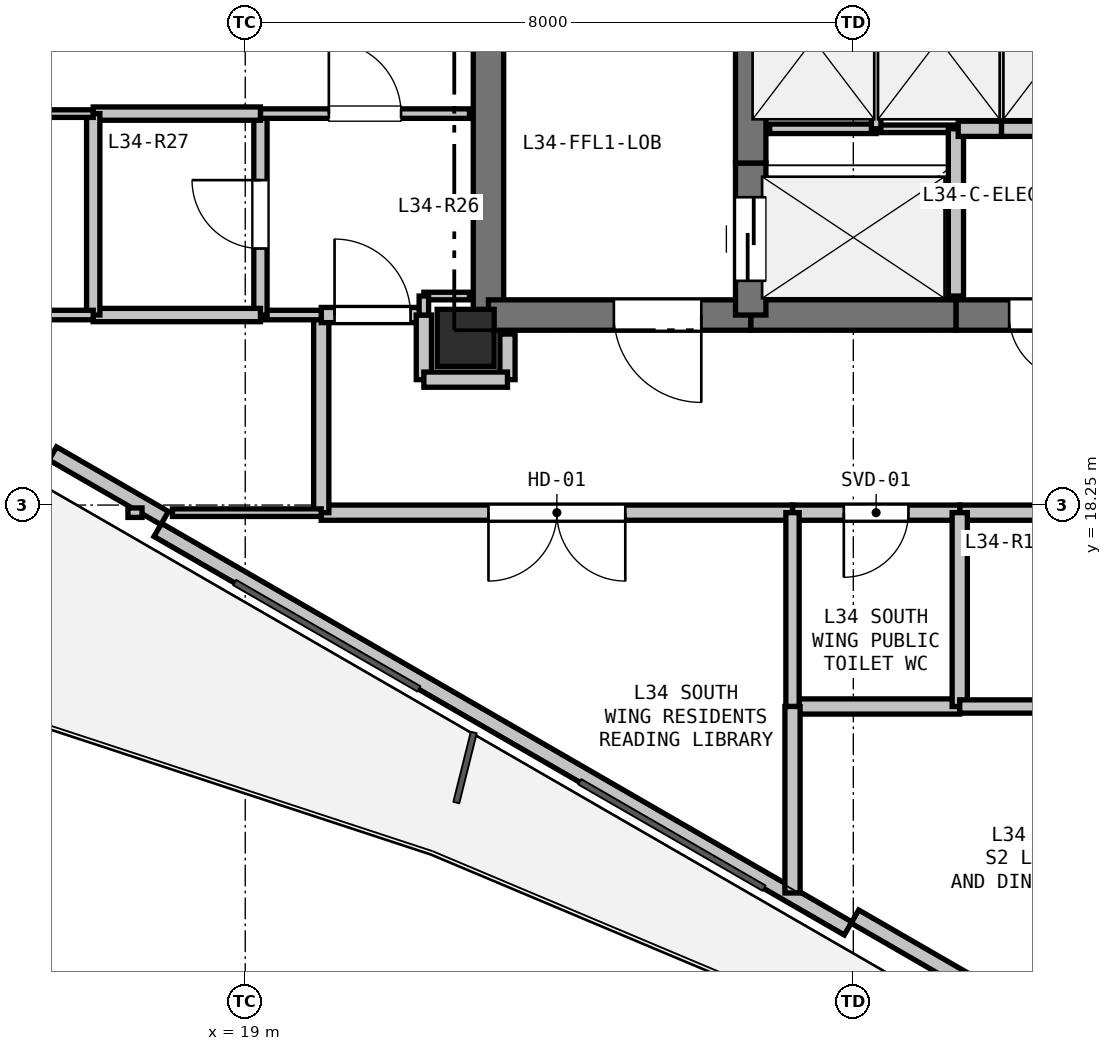
"""IFC4 building model, lengths in metres.
Left out: names, types, materials, properties, quantities, classifications, styles, units other than length and angle.
Written with IfcOpenShell. Run it as: python <this file> out.ifc"""

import sys

from ifc_helpers import new_model, si_unit, direction, frame, frame_2d, origin, origin_2d, place, context, subcontext, project, spatial, rectangle, extrude, element, fill, save


model = new_model("IFC4")
c1 = context("Model", 3, precision=1e-05, world=origin(), true_north=direction((0.0, 1.0)))
c2 = subcontext(c1, "Body", "Model", "MODEL_VIEW")
j1 = project(units=[si_unit("LENGTHUNIT", "METRE"), si_unit("PLANEANGLEUNIT", "RADIAN")], contexts=[c1])
p1 = place(None, origin())
s1 = spatial("IfcSite", under=j1, at=p1, CompositionType="ELEMENT")
p2 = place(p1, origin())
s2 = spatial("IfcBuilding", under=s1, at=p2, CompositionType="ELEMENT")
p3 = place(p2, frame((0.0, 0.0, 124.5)))
s3 = spatial("IfcBuildingStorey", under=s2, at=p3, CompositionType="ELEMENT", Elevation=124.5)
p4 = place(p3, frame((21.9, 20.45, 0.0), z_axis=(0.0, 0.0, 1.0), x_axis=(1.0, 0.0, 0.0)))
e1 = element("IfcColumn", 1, at=p4, inside=s3, PredefinedType="COLUMN", context=c2, shape_type="SweptSolid", body=[
    extrude(rectangle(XDim=0.75, YDim=0.75, at=origin_2d()), origin(), (0.0, 0.0, 1.0), 3.3),
])
p5 = place(p3, frame((26.931, 12.68, 0.0), z_axis=(0.0, 0.0, 1.0), x_axis=(-0.866026619769, 0.499997893847, 0.0)))
e2 = element("IfcWall", 2, at=p5, inside=s3, PredefinedType="PARAPET", context=c2, shape_type="SweptSolid", body=[
    extrude(rectangle(XDim=10.486, YDim=0.2, at=frame_2d((5.243, 0.0))), origin(), (0.0, 0.0, 1.0), 0.2),
])
for number, where, z_axis, x_axis in (
    (3, (28.493, 11.986, 0.0), (0.0, 0.0, 1.0), (-0.866, 0.5, 0.0)),
    (4, (17.94, 18.079, 0.0), (0.0, 0.0, 1.0), (-0.866, 0.5, 0.0)),
):
    element("IfcWall", number, at=place(p3, frame(where, z_axis=z_axis, x_axis=x_axis)), inside=s3, PredefinedType="PARAPET", context=c2, shape_type="SweptSolid", body=[
        extrude(rectangle(XDim=1.7, YDim=0.2, at=frame_2d((0.85, 0.0))), origin(), (0.0, 0.0, 1.0), 2.68),
    ])
p6 = place(p3, frame((22.2, 20.75, 0.0), z_axis=(0.0, 0.0, 1.0), x_axis=(0.0, 1.0, 0.0)))
e5 = element("IfcWall", 5, at=p6, inside=s3, PredefinedType="SHEAR", context=c2, shape_type="SweptSolid", body=[
    extrude(rectangle(XDim=4.65, YDim=0.4, at=frame_2d((2.325, 0.0))), origin(), (0.0, 0.0, 1.0), 3.06),
])
p7 = place(p3, frame((30.6, 20.75, 0.0), z_axis=(0.0, 0.0, 1.0), x_axis=(-1.0, 0.0, 0.0)))
e6 = element("IfcWall", 6, at=p7, inside=s3, PredefinedType="SHEAR", context=c2, shape_type="SweptSolid", body=[
    extrude(rectangle(XDim=2.25, YDim=0.4, at=frame_2d((1.125, 0.0))), origin(), (0.0, 0.0, 1.0), 3.06),
])
p8 = place(p7, frame((0.7, 0.0, 0.0)))
e7 = element("IfcOpeningElement", 7, at=p8, cuts=e6, PredefinedType="OPENING", context=c2, shape_type="SweptSolid", body=[
    extrude(rectangle(XDim=0.85, YDim=2.1, at=frame_2d((0.425, 1.05))), frame((0.0, 0.21, 0.0), z_axis=(0.0, -1.0, 0.0), x_axis=(1.0, 0.0, 0.0)), (0.0, 0.0, 1.0), 0.42),
])
p9 = place(p3, frame((28.35, 20.75, 0.0), z_axis=(0.0, 0.0, 1.0), x_axis=(-1.0, 0.0, 0.0)))
e8 = element("IfcWall", 8, at=p9, inside=s3, PredefinedType="SHEAR", context=c2, shape_type="SweptSolid", body=[
    extrude(rectangle(XDim=2.7, YDim=0.4, at=frame_2d((1.35, 0.0))), origin(), (0.0, 0.0, 1.0), 3.06),
])
p10 = place(p3, frame((25.65, 20.75, 0.0), z_axis=(0.0, 0.0, 1.0), x_axis=(-1.0, 0.0, 0.0)))
e9 = element("IfcWall", 9, at=p10, inside=s3, PredefinedType="SHEAR", context=c2, shape_type="SweptSolid", body=[
    extrude(rectangle(XDim=3.45, YDim=0.4, at=frame_2d((1.725, 0.0))), origin(), (0.0, 0.0, 1.0), 3.06),
])
p11 = place(p10, frame((0.65, 0.0, 0.0)))
e10 = element("IfcOpeningElement", 10, at=p11, cuts=e9, PredefinedType="OPENING", context=c2, shape_type="SweptSolid", body=[
    extrude(rectangle(XDim=1.15, YDim=2.15, at=frame_2d((0.575, 1.075))), frame((0.0, 0.21, 0.0), z_axis=(0.0, -1.0, 0.0), x_axis=(1.0, 0.0, 0.0)), (0.0, 0.0, 1.0), 0.42),
])
p12 = place(p3, frame((25.65, 20.75, 0.0), z_axis=(0.0, 0.0, 1.0), x_axis=(0.0, 1.0, 0.0)))
e11 = element("IfcWall", 11, at=p12, inside=s3, PredefinedType="SHEAR", context=c2, shape_type="SweptSolid", body=[
    extrude(rectangle(XDim=2.0, YDim=0.4, at=frame_2d((1.0, 0.0))), origin(), (0.0, 0.0, 1.0), 3.06),
])
p13 = place(p12, frame((0.45, 0.0, 0.0)))
e12 = element("IfcOpeningElement", 12, at=p13, cuts=e11, PredefinedType="OPENING", context=c2, shape_type="SweptSolid", body=[
    extrude(rectangle(XDim=1.1, YDim=2.15, at=frame_2d((0.55, 1.075))), frame((0.0, 0.21, 0.0), z_axis=(0.0, -1.0, 0.0), x_axis=(1.0, 0.0, 0.0)), (0.0, 0.0, 1.0), 0.42),
])
p14 = place(p3, frame((25.65, 22.75, 0.0), z_axis=(0.0, 0.0, 1.0), x_axis=(0.0, 1.0, 0.0)))
e13 = element("IfcWall", 13, at=p14, inside=s3, PredefinedType="SHEAR", context=c2, shape_type="SweptSolid", body=[
    extrude(rectangle(XDim=2.8, YDim=0.4, at=frame_2d((1.4, 0.0))), origin(), (0.0, 0.0, 1.0), 3.06),
])
p15 = place(p3, frame((25.9, 23.2, 0.0), z_axis=(0.0, 0.0, 1.0), x_axis=(1.0, 0.0, 0.0)))
e14 = element("IfcWall", 14, at=p15, inside=s3, PredefinedType="PARTITIONING", context=c2, shape_type="SweptSolid", body=[
    extrude(rectangle(XDim=1.4, YDim=0.125, at=frame_2d((0.7, 0.0))), origin(), (0.0, 0.0, 1.0), 3.06),
])
p16 = place(p3, frame((27.3, 23.2, 0.0), z_axis=(0.0, 0.0, 1.0), x_axis=(1.0, 0.0, 0.0)))
e15 = element("IfcWall", 15, at=p16, inside=s3, PredefinedType="PARTITIONING", context=c2, shape_type="SweptSolid", body=[
    extrude(rectangle(XDim=1.05, YDim=0.1, at=frame_2d((0.525, 0.0))), origin(), (0.0, 0.0, 1.0), 3.06),
])
p17 = place(p3, frame((28.35, 23.2, 0.0), z_axis=(0.0, 0.0, 1.0), x_axis=(0.0, -1.0, 0.0)))
e16 = element("IfcWall", 16, at=p17, inside=s3, PredefinedType="PARTITIONING", context=c2, shape_type="SweptSolid", body=[
    extrude(rectangle(XDim=2.2, YDim=0.2, at=frame_2d((1.1, 0.0))), origin(), (0.0, 0.0, 1.0), 3.06),
])
p18 = place(p3, frame((27.3, 25.4, 0.0), z_axis=(0.0, 0.0, 1.0), x_axis=(0.0, -1.0, 0.0)))
e17 = element("IfcWall", 17, at=p18, inside=s3, PredefinedType="PARTITIONING", context=c2, shape_type="SweptSolid", body=[
    extrude(rectangle(XDim=2.2, YDim=0.125, at=frame_2d((1.1, 0.0))), origin(), (0.0, 0.0, 1.0), 3.06),
])
p19 = place(p3, frame((28.95, 25.4, 0.0), z_axis=(0.0, 0.0, 1.0), x_axis=(0.0, -1.0, 0.0)))
e18 = element("IfcWall", 18, at=p19, inside=s3, PredefinedType="PARTITIONING", context=c2, shape_type="SweptSolid", body=[
    extrude(rectangle(XDim=2.2, YDim=0.1, at=frame_2d((1.1, 0.0))), origin(), (0.0, 0.0, 1.0), 3.06),
])
p20 = place(p3, frame((28.95, 23.2, 0.0), z_axis=(0.0, 0.0, 1.0), x_axis=(-1.0, 0.0, 0.0)))
e19 = element("IfcWall", 19, at=p20, inside=s3, PredefinedType="PARTITIONING", context=c2, shape_type="SweptSolid", body=[
    extrude(rectangle(XDim=0.57, YDim=0.2, at=frame_2d((0.285, 0.0))), origin(), (0.0, 0.0, 1.0), 3.06),
])
p21 = place(p3, frame((30.6, 23.2, 0.0), z_axis=(0.0, 0.0, 1.0), x_axis=(-1.0, 0.0, 0.0)))
e20 = element("IfcWall", 20, at=p21, inside=s3, PredefinedType="PARTITIONING", context=c2, shape_type="SweptSolid", body=[
    extrude(rectangle(XDim=1.65, YDim=0.2, at=frame_2d((0.825, 0.0))), origin(), (0.0, 0.0, 1.0), 3.06),
])
p22 = place(p3, frame((22.45, 19.9, 0.0), z_axis=(0.0, 0.0, 1.0), x_axis=(0.0, 1.0, 0.0)))
e21 = element("IfcWall", 21, at=p22, inside=s3, PredefinedType="PARTITIONING", context=c2, shape_type="SweptSolid", body=[
    extrude(rectangle(XDim=0.6, YDim=0.2, at=frame_2d((0.3, 0.0))), origin(), (0.0, 0.0, 1.0), 2.433),
])
p23 = place(p3, frame((30.4, 18.15, 0.0), z_axis=(0.0, 0.0, 1.0), x_axis=(-1.0, 0.0, 0.0)))
e22 = element("IfcWall", 22, at=p23, inside=s3, PredefinedType="PARTITIONING", context=c2, shape_type="SweptSolid", body=[
    extrude(rectangle(XDim=2.0, YDim=0.2, at=frame_2d((1.0, 0.0))), origin(), (0.0, 0.0, 1.0), 3.06),
])
p24 = place(p3, frame((28.4, 18.15, 0.0), z_axis=(0.0, 0.0, 1.0), x_axis=(-1.0, 0.0, 0.0)))
e23 = element("IfcWall", 23, at=p24, inside=s3, PredefinedType="PARTITIONING", context=c2, shape_type="SweptSolid", body=[
    extrude(rectangle(XDim=2.2, YDim=0.2, at=frame_2d((1.1, 0.0))), origin(), (0.0, 0.0, 1.0), 3.06),
])
p25 = place(p24, frame((0.675, 0.0, 0.0)))
e24 = element("IfcOpeningElement", 24, at=p25, cuts=e23, PredefinedType="OPENING", context=c2, shape_type="SweptSolid", body=[
    extrude(rectangle(XDim=0.85, YDim=2.1, at=frame_2d((0.425, 1.05))), frame((0.0, 0.11, 0.0), z_axis=(0.0, -1.0, 0.0), x_axis=(1.0, 0.0, 0.0)), (0.0, 0.0, 1.0), 0.22),
])
p26 = place(p3, frame((26.2, 18.15, 0.0), z_axis=(0.0, 0.0, 1.0), x_axis=(-1.0, 0.0, 0.0)))
e25 = element("IfcWall", 25, at=p26, inside=s3, PredefinedType="PARTITIONING", context=c2, shape_type="SweptSolid", body=[
    extrude(rectangle(XDim=6.2, YDim=0.2, at=frame_2d((3.1, 0.0))), origin(), (0.0, 0.0, 1.0), 2.433),
])
p27 = place(p26, frame((2.2, 0.0, 0.0)))
e26 = element("IfcOpeningElement", 26, at=p27, cuts=e25, PredefinedType="OPENING", context=c2, shape_type="SweptSolid", body=[
    extrude(rectangle(XDim=1.8, YDim=2.2, at=frame_2d((0.9, 1.1))), frame((0.0, 0.11, 0.0), z_axis=(0.0, -1.0, 0.0), x_axis=(1.0, 0.0, 0.0)), (0.0, 0.0, 1.0), 0.22),
])
p28 = place(p3, frame((20.0, 18.15, 0.0), z_axis=(0.0, 0.0, 1.0), x_axis=(0.0, 1.0, 0.0)))
e27 = element("IfcWall", 27, at=p28, inside=s3, PredefinedType="PARTITIONING", context=c2, shape_type="SweptSolid", body=[
    extrude(rectangle(XDim=2.6, YDim=0.2, at=frame_2d((1.3, 0.0))), origin(), (0.0, 0.0, 1.0), 3.06),
])
p29 = place(p3, frame((20.0, 20.75, 0.0), z_axis=(0.0, 0.0, 1.0), x_axis=(1.0, 0.0, 0.0)))
e28 = element("IfcWall", 28, at=p29, inside=s3, PredefinedType="PARTITIONING", context=c2, shape_type="SweptSolid", body=[
    extrude(rectangle(XDim=1.35, YDim=0.2, at=frame_2d((0.675, 0.0))), origin(), (0.0, 0.0, 1.0), 2.433),
])
p30 = place(p29, frame((0.175, 0.0, 0.0)))
e29 = element("IfcOpeningElement", 29, at=p30, cuts=e28, PredefinedType="OPENING", context=c2, shape_type="SweptSolid", body=[
    extrude(rectangle(XDim=1.0, YDim=2.15, at=frame_2d((0.5, 1.075))), frame((0.0, 0.11, 0.0), z_axis=(0.0, -1.0, 0.0), x_axis=(1.0, 0.0, 0.0)), (0.0, 0.0, 1.0), 0.22),
])
p31 = place(p3, frame((21.35, 20.75, 0.0), z_axis=(0.0, 0.0, 1.0), x_axis=(0.0, -1.0, 0.0)))
e30 = element("IfcWall", 30, at=p31, inside=s3, PredefinedType="PARTITIONING", context=c2, shape_type="SweptSolid", body=[
    extrude(rectangle(XDim=0.85, YDim=0.2, at=frame_2d((0.425, 0.0))), origin(), (0.0, 0.0, 1.0), 2.433),
])
p32 = place(p3, frame((21.35, 19.9, 0.0), z_axis=(0.0, 0.0, 1.0), x_axis=(1.0, 0.0, 0.0)))
e31 = element("IfcWall", 31, at=p32, inside=s3, PredefinedType="PARTITIONING", context=c2, shape_type="SweptSolid", body=[
    extrude(rectangle(XDim=1.1, YDim=0.2, at=frame_2d((0.55, 0.0))), origin(), (0.0, 0.0, 1.0), 2.433),
])
p33 = place(p3, frame((20.0, 20.75, 0.0), z_axis=(0.0, 0.0, 1.0), x_axis=(-1.0, 0.0, 0.0)))
e32 = element("IfcWall", 32, at=p33, inside=s3, PredefinedType="PARTITIONING", context=c2, shape_type="SweptSolid", body=[
    extrude(rectangle(XDim=0.8, YDim=0.125, at=frame_2d((0.4, 0.0))), origin(), (0.0, 0.0, 1.0), 3.06),
])
p34 = place(p3, frame((19.2, 20.75, 0.0), z_axis=(0.0, 0.0, 1.0), x_axis=(0.0, 1.0, 0.0)))
e33 = element("IfcWall", 33, at=p34, inside=s3, PredefinedType="PLUMBINGWALL", context=c2, shape_type="SweptSolid", body=[
    extrude(rectangle(XDim=2.65, YDim=0.175, at=frame_2d((1.325, 0.0))), origin(), (0.0, 0.0, 1.0), 2.433),
])
p35 = place(p34, frame((0.875, 0.0, 0.0)))
e34 = element("IfcOpeningElement", 34, at=p35, cuts=e33, PredefinedType="OPENING", context=c2, shape_type="SweptSolid", body=[
    extrude(rectangle(XDim=0.9, YDim=2.1, at=frame_2d((0.45, 1.05))), frame((0.0, 0.097, 0.0), z_axis=(0.0, -1.0, 0.0), x_axis=(1.0, 0.0, 0.0)), (0.0, 0.0, 1.0), 0.195),
])
p36 = place(p3, frame((19.2, 23.4, 0.0), z_axis=(0.0, 0.0, 1.0), x_axis=(1.0, 0.0, 0.0)))
e35 = element("IfcWall", 35, at=p36, inside=s3, PredefinedType="PARTITIONING", context=c2, shape_type="SweptSolid", body=[
    extrude(rectangle(XDim=2.75, YDim=0.125, at=frame_2d((1.375, 0.0))), origin(), (0.0, 0.0, 1.0), 2.508),
])
p37 = place(p36, frame((0.9, 0.0, 0.0)))
e36 = element("IfcOpeningElement", 36, at=p37, cuts=e35, PredefinedType="OPENING", context=c2, shape_type="SweptSolid", body=[
    extrude(rectangle(XDim=0.95, YDim=2.1, at=frame_2d((0.475, 1.05))), frame((0.0, 0.073, 0.0), z_axis=(0.0, -1.0, 0.0), x_axis=(1.0, 0.0, 0.0)), (0.0, 0.0, 1.0), 0.145),
])
p38 = place(p3, frame((21.95, 21.0, 0.0), z_axis=(0.0, 0.0, 1.0), x_axis=(-1.0, 0.0, 0.0)))
e37 = element("IfcWall", 37, at=p38, inside=s3, PredefinedType="PARTITIONING", context=c2, shape_type="SweptSolid", body=[
    extrude(rectangle(XDim=0.6, YDim=0.1, at=frame_2d((0.3, 0.0))), origin(), (0.0, 0.0, 1.0), 2.508),
])
p39 = place(p3, frame((21.35, 21.0, 0.0), z_axis=(0.0, 0.0, 1.0), x_axis=(0.0, -1.0, 0.0)))
e38 = element("IfcWall", 38, at=p39, inside=s3, PredefinedType="PARTITIONING", context=c2, shape_type="SweptSolid", body=[
    extrude(rectangle(XDim=0.25, YDim=0.125, at=frame_2d((0.125, 0.0))), origin(), (0.0, 0.0, 1.0), 3.06),
])
p40 = place(p3, frame((28.4, 15.6, 0.0), z_axis=(0.0, 0.0, 1.0), x_axis=(-1.0, 0.0, 0.0)))
e39 = element("IfcWall", 39, at=p40, inside=s3, PredefinedType="PARTITIONING", context=c2, shape_type="SweptSolid", body=[
    extrude(rectangle(XDim=2.2, YDim=0.2, at=frame_2d((1.1, 0.0))), origin(), (0.0, 0.0, 1.0), 2.433),
])
p41 = place(p3, frame((26.2, 15.6, 0.0), z_axis=(0.0, 0.0, 1.0), x_axis=(0.0, 1.0, 0.0)))
e40 = element("IfcWall", 40, at=p41, inside=s3, PredefinedType="PLUMBINGWALL", context=c2, shape_type="SweptSolid", body=[
    extrude(rectangle(XDim=2.55, YDim=0.175, at=frame_2d((1.275, 0.0))), origin(), (0.0, 0.0, 1.0), 2.433),
])
p42 = place(p3, frame((28.4, 18.15, 0.0), z_axis=(0.0, 0.0, 1.0), x_axis=(0.0, -1.0, 0.0)))
e41 = element("IfcWall", 41, at=p42, inside=s3, PredefinedType="PARTITIONING", context=c2, shape_type="SweptSolid", body=[
    extrude(rectangle(XDim=2.55, YDim=0.2, at=frame_2d((1.275, 0.0))), origin(), (0.0, 0.0, 1.0), 3.06),
])
p43 = place(p3, frame((30.4, 15.6, 0.0), z_axis=(0.0, 0.0, 1.0), x_axis=(-1.0, 0.0, 0.0)))
e42 = element("IfcWall", 42, at=p43, inside=s3, PredefinedType="PLUMBINGWALL", context=c2, shape_type="SweptSolid", body=[
    extrude(rectangle(XDim=2.0, YDim=0.175, at=frame_2d((1.0, 0.0))), origin(), (0.0, 0.0, 1.0), 3.06),
])
for number, where, z_axis, x_axis in (
    (43, (17.0, 23.4, 0.0), (0.0, 0.0, 1.0), (1.0, 0.0, 0.0)),
    (44, (19.2, 20.75, 0.0), (0.0, 0.0, 1.0), (-1.0, 0.0, 0.0)),
):
    element("IfcWall", number, at=place(p3, frame(where, z_axis=z_axis, x_axis=x_axis)), inside=s3, PredefinedType="PLUMBINGWALL", context=c2, shape_type="SweptSolid", body=[
        extrude(rectangle(XDim=2.2, YDim=0.175, at=frame_2d((1.1, 0.0))), origin(), (0.0, 0.0, 1.0), 3.06),
    ])
p44 = place(p3, frame((17.0, 20.75, 0.0), z_axis=(0.0, 0.0, 1.0), x_axis=(0.0, 1.0, 0.0)))
e45 = element("IfcWall", 45, at=p44, inside=s3, PredefinedType="PLUMBINGWALL", context=c2, shape_type="SweptSolid", body=[
    extrude(rectangle(XDim=2.65, YDim=0.175, at=frame_2d((1.325, 0.0))), origin(), (0.0, 0.0, 1.0), 2.433),
])
p45 = place(p3, frame((14.0, 23.4, 0.0), z_axis=(0.0, 0.0, 1.0), x_axis=(1.0, 0.0, 0.0)))
e46 = element("IfcWall", 46, at=p45, inside=s3, PredefinedType="PARTITIONING", context=c2, shape_type="SweptSolid", body=[
    extrude(rectangle(XDim=3.0, YDim=0.1, at=frame_2d((1.5, 0.0))), origin(), (0.0, 0.0, 1.0), 3.06),
])
p46 = place(p45, frame((1.025, 0.0, 0.0)))
e47 = element("IfcOpeningElement", 47, at=p46, cuts=e46, PredefinedType="OPENING", context=c2, shape_type="SweptSolid", body=[
    extrude(rectangle(XDim=0.95, YDim=2.1, at=frame_2d((0.475, 1.05))), frame((0.0, 0.06, 0.0), z_axis=(0.0, -1.0, 0.0), x_axis=(1.0, 0.0, 0.0)), (0.0, 0.0, 1.0), 0.12),
])
p47 = place(p3, frame((17.0, 20.75, 0.0), z_axis=(0.0, 0.0, 1.0), x_axis=(-1.0, 0.0, 0.0)))
e48 = element("IfcWall", 48, at=p47, inside=s3, PredefinedType="PARTITIONING", context=c2, shape_type="SweptSolid", body=[
    extrude(rectangle(XDim=3.0, YDim=0.125, at=frame_2d((1.5, 0.0))), origin(), (0.0, 0.0, 1.0), 2.365),
])
p48 = place(p3, frame((17.457, 18.15, 0.0), z_axis=(0.0, 0.0, 1.0), x_axis=(1.0, 0.0, 0.0)))
e49 = element("IfcWall", 49, at=p48, inside=s3, PredefinedType="PARTITIONING", context=c2, shape_type="SweptSolid", body=[
    extrude(rectangle(XDim=0.185, YDim=0.125, at=frame_2d((0.093, 0.0))), origin(), (0.0, 0.0, 1.0), 3.06),
])
p49 = place(p3, frame((18.042, 18.15, 0.0), z_axis=(0.0, 0.0, 1.0), x_axis=(1.0, 0.0, 0.0)))
e50 = element("IfcWall", 50, at=p49, inside=s3, PredefinedType="PARTITIONING", context=c2, shape_type="SweptSolid", body=[
    extrude(rectangle(XDim=1.958, YDim=0.1, at=frame_2d((0.979, 0.0))), origin(), (0.0, 0.0, 1.0), 2.365),
])
p50 = place(p3, frame((26.2, 15.6, 0.0), z_axis=(0.0, 0.0, 1.0), x_axis=(0.0, -1.0, 0.0)))
e51 = element("IfcWall", 51, at=p50, inside=s3, PredefinedType="PARTITIONING", context=c2, shape_type="SweptSolid", body=[
    extrude(rectangle(XDim=2.454, YDim=0.2, at=frame_2d((1.227, 0.0))), origin(), (0.0, 0.0, 1.0), 2.365),
])
p51 = place(p13, origin())
e52 = element("IfcDoor", 52, at=p51, inside=s3, OperationType="SLIDING_TO_LEFT", PredefinedType="DOOR", context=c2, shape_type="SweptSolid", body=[
    extrude(rectangle(XDim=1.1, YDim=2.15, at=frame_2d((0.55, 1.075))), frame((0.0, 0.025, 0.0), z_axis=(0.0, -1.0, 0.0), x_axis=(1.0, 0.0, 0.0)), (0.0, 0.0, 1.0), 0.05),
])
fill(e12, e52)
p52 = place(p11, origin())
e53 = element("IfcDoor", 53, at=p52, inside=s3, OperationType="SINGLE_SWING_LEFT", PredefinedType="DOOR", context=c2, shape_type="SweptSolid", body=[
    extrude(rectangle(XDim=1.15, YDim=2.15, at=frame_2d((0.575, 1.075))), frame((0.0, 0.025, 0.0), z_axis=(0.0, -1.0, 0.0), x_axis=(1.0, 0.0, 0.0)), (0.0, 0.0, 1.0), 0.05),
])
fill(e10, e53)
p53 = place(p30, origin())
e54 = element("IfcDoor", 54, at=p53, inside=s3, OperationType="SINGLE_SWING_LEFT", PredefinedType="DOOR", context=c2, shape_type="SweptSolid", body=[
    extrude(rectangle(XDim=1.0, YDim=2.15, at=frame_2d((0.5, 1.075))), frame((0.0, 0.025, 0.0), z_axis=(0.0, -1.0, 0.0), x_axis=(1.0, 0.0, 0.0)), (0.0, 0.0, 1.0), 0.05),
])
fill(e29, e54)
p54 = place(p25, origin())
e55 = element("IfcDoor", 55, at=p54, inside=s3, OperationType="SINGLE_SWING_RIGHT", PredefinedType="DOOR", context=c2, shape_type="SweptSolid", body=[
    extrude(rectangle(XDim=0.85, YDim=2.1, at=frame_2d((0.425, 1.05))), frame((0.0, 0.025, 0.0), z_axis=(0.0, -1.0, 0.0), x_axis=(1.0, 0.0, 0.0)), (0.0, 0.0, 1.0), 0.05),
])
fill(e24, e55)
p55 = place(p8, origin())
e56 = element("IfcDoor", 56, at=p55, inside=s3, OperationType="SINGLE_SWING_LEFT", PredefinedType="DOOR", context=c2, shape_type="SweptSolid", body=[
    extrude(rectangle(XDim=0.85, YDim=2.1, at=frame_2d((0.425, 1.05))), frame((0.0, 0.025, 0.0), z_axis=(0.0, -1.0, 0.0), x_axis=(1.0, 0.0, 0.0)), (0.0, 0.0, 1.0), 0.05),
])
fill(e7, e56)
p56 = place(p27, origin())
e57 = element("IfcDoor", 57, at=p56, inside=s3, OperationType="DOUBLE_DOOR_SINGLE_SWING", PredefinedType="DOOR", context=c2, shape_type="SweptSolid", body=[
    extrude(rectangle(XDim=1.8, YDim=2.2, at=frame_2d((0.9, 1.1))), frame((0.0, 0.025, 0.0), z_axis=(0.0, -1.0, 0.0), x_axis=(1.0, 0.0, 0.0)), (0.0, 0.0, 1.0), 0.05),
])
fill(e26, e57)
p57 = place(p35, origin())
e58 = element("IfcDoor", 58, at=p57, inside=s3, OperationType="SINGLE_SWING_RIGHT", PredefinedType="DOOR", context=c2, shape_type="SweptSolid", body=[
    extrude(rectangle(XDim=0.9, YDim=2.1, at=frame_2d((0.45, 1.05))), frame((0.0, 0.025, 0.0), z_axis=(0.0, -1.0, 0.0), x_axis=(1.0, 0.0, 0.0)), (0.0, 0.0, 1.0), 0.05),
])
fill(e34, e58)
p58 = place(p37, origin())
e59 = element("IfcDoor", 59, at=p58, inside=s3, OperationType="SINGLE_SWING_LEFT", PredefinedType="DOOR", context=c2, shape_type="SweptSolid", body=[
    extrude(rectangle(XDim=0.95, YDim=2.1, at=frame_2d((0.475, 1.05))), frame((0.0, 0.025, 0.0), z_axis=(0.0, -1.0, 0.0), x_axis=(1.0, 0.0, 0.0)), (0.0, 0.0, 1.0), 0.05),
])
fill(e36, e59)
save(model, sys.argv[1])
